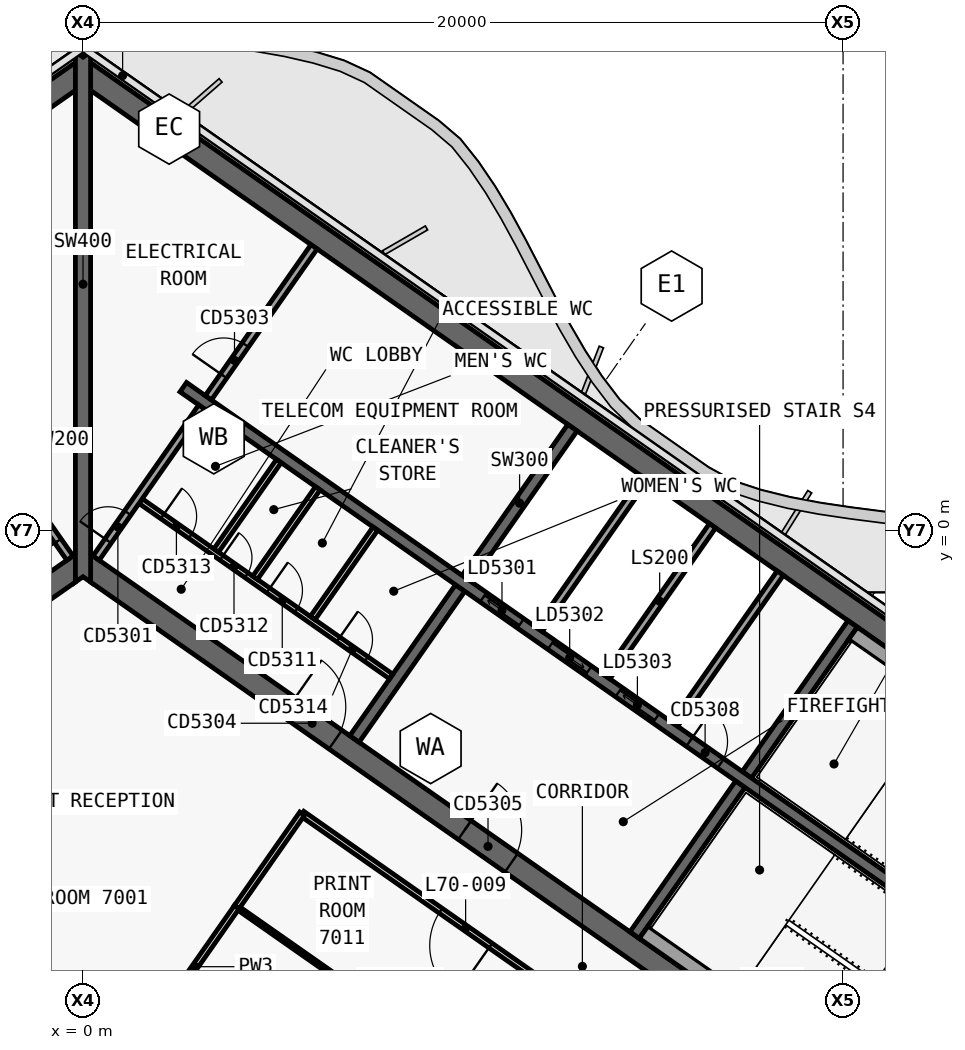
"""IFC4 building model, lengths in metres.
Left out: names, types, materials, properties, quantities, classifications, styles, units other than length and angle.
Written with IfcOpenShell. Run it as: python <this file> out.ifc"""

import sys

from ifc_helpers import new_model, si_unit, direction, frame, frame_2d, origin, place, context, subcontext, project, spatial, polyline, rectangle, outline, extrude, element, fill, save


model = new_model("IFC4")
c1 = context("Model", 3, precision=1e-05, world=origin(), true_north=direction((0.0, 1.0)))
c2 = subcontext(c1, "Body", "Model", "MODEL_VIEW")
j1 = project(units=[si_unit("LENGTHUNIT", "METRE"), si_unit("PLANEANGLEUNIT", "RADIAN")], contexts=[c1])
p1 = place(None, origin())
s1 = spatial("IfcSite", under=j1, at=p1, CompositionType="ELEMENT")
p2 = place(p1, origin())
s2 = spatial("IfcBuilding", under=s1, at=p2, CompositionType="ELEMENT")
p3 = place(p2, frame((0.0, 0.0, 295.6)))
s3 = spatial("IfcBuildingStorey", under=s2, at=p3, CompositionType="ELEMENT", Elevation=295.6)
p4 = place(p3, frame((-0.028, 12.066, 0.0), z_axis=(0.0, 0.0, 1.0), x_axis=(-0.819151382952, -0.573577380837, 0.0)))
e1 = element("IfcWall", 1, at=p4, inside=s3, PredefinedType="SHEAR", context=c2, shape_type="SweptSolid", body=[
    extrude(outline(polyline([(33.898, 0.3), (0.42, 0.3), (0.0, -0.3), (33.898, -0.3), (33.898, 0.3)])), origin(), (0.0, 0.0, 1.0), 3.9),
])
p5 = place(p3, frame((-0.028, -0.874, 0.0), z_axis=(0.0, 0.0, 1.0), x_axis=(-0.819150035022, -0.573579305871, 0.0)))
e2 = element("IfcWall", 2, at=p5, inside=s3, PredefinedType="SHEAR", context=c2, shape_type="SweptSolid", body=[
    extrude(outline(polyline([(26.476, 0.3), (0.42, 0.3), (0.0, -0.3), (26.476, -0.3), (26.476, 0.3)])), origin(), (0.0, 0.0, 1.0), 3.9),
])
p6 = place(p5, frame((2.976, 0.0, 0.0)))
e3 = element("IfcOpeningElement", 3, at=p6, cuts=e2, PredefinedType="OPENING", context=c2, shape_type="SweptSolid", body=[
    extrude(rectangle(XDim=2.4, YDim=2.1, at=frame_2d((1.2, 1.05))), frame((0.0, 0.31, 0.0), z_axis=(0.0, -1.0, 0.0), x_axis=(1.0, 0.0, 0.0)), (0.0, 0.0, 1.0), 0.62),
])
p7 = place(p5, frame((11.776, 0.0, 0.0)))
e4 = element("IfcOpeningElement", 4, at=p7, cuts=e2, PredefinedType="OPENING", context=c2, shape_type="SweptSolid", body=[
    extrude(rectangle(XDim=2.4, YDim=2.1, at=frame_2d((1.2, 1.05))), frame((0.0, 0.31, 0.0), z_axis=(0.0, -1.0, 0.0), x_axis=(1.0, 0.0, 0.0)), (0.0, 0.0, 1.0), 0.62),
])
p8 = place(p3, frame((0.028, 12.066, 0.0), z_axis=(0.0, 0.0, 1.0), x_axis=(0.819151382952, -0.573577380837, 0.0)))
e5 = element("IfcWall", 5, at=p8, inside=s3, PredefinedType="SHEAR", context=c2, shape_type="SweptSolid", body=[
    extrude(outline(polyline([(33.898, 0.3), (0.0, 0.3), (0.42, -0.3), (33.898, -0.3), (33.898, 0.3)])), origin(), (0.0, 0.0, 1.0), 3.9),
])
p9 = place(p3, frame((0.028, -0.874, 0.0), z_axis=(0.0, 0.0, 1.0), x_axis=(0.819150035022, -0.573579305871, 0.0)))
e6 = element("IfcWall", 6, at=p9, inside=s3, PredefinedType="SHEAR", context=c2, shape_type="SweptSolid", body=[
    extrude(outline(polyline([(26.476, 0.3), (0.0, 0.3), (0.42, -0.3), (26.476, -0.3), (26.476, 0.3)])), origin(), (0.0, 0.0, 1.0), 3.9),
])
p10 = place(p9, frame((6.576, 0.0, 0.0)))
e7 = element("IfcOpeningElement", 7, at=p10, cuts=e6, PredefinedType="OPENING", context=c2, shape_type="SweptSolid", body=[
    extrude(rectangle(XDim=1.5, YDim=2.1, at=frame_2d((0.75, 1.05))), frame((0.0, 0.31, 0.0), z_axis=(0.0, -1.0, 0.0), x_axis=(1.0, 0.0, 0.0)), (0.0, 0.0, 1.0), 0.62),
])
p11 = place(p9, frame((12.226, 0.0, 0.0)))
e8 = element("IfcOpeningElement", 8, at=p11, cuts=e6, PredefinedType="OPENING", context=c2, shape_type="SweptSolid", body=[
    extrude(rectangle(XDim=1.5, YDim=2.1, at=frame_2d((0.75, 1.05))), frame((0.0, 0.31, 0.0), z_axis=(0.0, -1.0, 0.0), x_axis=(1.0, 0.0, 0.0)), (0.0, 0.0, 1.0), 0.62),
])
p12 = place(p3, frame((7.143, -5.49, 0.0), z_axis=(0.0, 0.0, 1.0), x_axis=(0.573617744349, 0.819123118565, 0.0)))
e9 = element("IfcWall", 9, at=p12, inside=s3, PredefinedType="SHEAR", context=c2, shape_type="SweptSolid", body=[
    extrude(outline(polyline([(0.0, 0.15), (0.0, -0.15), (4.85, -0.15), (4.85, 0.15), (0.0, 0.15)])), origin(), (0.0, 0.0, 1.0), 3.9),
])
p13 = place(p3, frame((10.097, -1.271, 0.0), z_axis=(0.0, 0.0, 1.0), x_axis=(0.573560315113, 0.819163332265, 0.0)))
e10 = element("IfcWall", 10, at=p13, inside=s3, PredefinedType="SHEAR", context=c2, shape_type="SweptSolid", body=[
    extrude(outline(polyline([(4.85, -0.15), (4.85, 0.15), (0.0, 0.15), (0.0, -0.15), (4.85, -0.15)])), origin(), (0.0, 0.0, 1.0), 3.9),
])
p14 = place(p3, frame((14.515, -10.652, 0.0), z_axis=(0.0, 0.0, 1.0), x_axis=(0.573560315113, 0.819163332265, 0.0)))
e11 = element("IfcWall", 11, at=p14, inside=s3, PredefinedType="SHEAR", context=c2, shape_type="SweptSolid", body=[
    extrude(outline(polyline([(0.0, 0.15), (0.0, -0.15), (4.85, -0.15), (4.85, 0.15), (0.0, 0.15)])), origin(), (0.0, 0.0, 1.0), 3.9),
])
p15 = place(p3, frame((17.469, -6.433, 0.0), z_axis=(0.0, 0.0, 1.0), x_axis=(0.573594092424, 0.81913968109, 0.0)))
e12 = element("IfcWall", 12, at=p15, inside=s3, PredefinedType="SHEAR", context=c2, shape_type="SweptSolid", body=[
    extrude(outline(polyline([(4.85, -0.15), (4.85, 0.15), (0.0, 0.15), (0.0, -0.15), (4.85, -0.15)])), origin(), (0.0, 0.0, 1.0), 3.9),
])
p16 = place(p3, frame((2.638, 3.768, 0.0), z_axis=(0.0, 0.0, 1.0), x_axis=(0.819155014212, -0.573572194837, 0.0)))
e13 = element("IfcWall", 13, at=p16, inside=s3, PredefinedType="SHEAR", context=c2, shape_type="SweptSolid", body=[
    extrude(outline(polyline([(0.0, 0.15), (0.0, -0.15), (26.4, -0.15), (26.4, 0.15), (0.0, 0.15)])), origin(), (0.0, 0.0, 1.0), 3.9),
])
p17 = place(p16, frame((9.637, 0.0, 0.0)))
e14 = element("IfcOpeningElement", 14, at=p17, cuts=e13, PredefinedType="OPENING", context=c2, shape_type="SweptSolid", body=[
    extrude(rectangle(XDim=1.2, YDim=2.1, at=frame_2d((0.6, 1.05))), frame((0.0, 0.16, 0.0), z_axis=(0.0, -1.0, 0.0), x_axis=(1.0, 0.0, 0.0)), (0.0, 0.0, 1.0), 0.32),
])
p18 = place(p16, frame((11.812, 0.0, 0.0)))
e15 = element("IfcOpeningElement", 15, at=p18, cuts=e13, PredefinedType="OPENING", context=c2, shape_type="SweptSolid", body=[
    extrude(rectangle(XDim=1.2, YDim=2.1, at=frame_2d((0.6, 1.05))), frame((0.0, 0.16, 0.0), z_axis=(0.0, -1.0, 0.0), x_axis=(1.0, 0.0, 0.0)), (0.0, 0.0, 1.0), 0.32),
])
p19 = place(p16, frame((13.988, 0.0, 0.0)))
e16 = element("IfcOpeningElement", 16, at=p19, cuts=e13, PredefinedType="OPENING", context=c2, shape_type="SweptSolid", body=[
    extrude(rectangle(XDim=1.2, YDim=2.1, at=frame_2d((0.6, 1.05))), frame((0.0, 0.16, 0.0), z_axis=(0.0, -1.0, 0.0), x_axis=(1.0, 0.0, 0.0)), (0.0, 0.0, 1.0), 0.32),
])
p20 = place(p16, frame((16.262, 0.0, 0.0)))
e17 = element("IfcOpeningElement", 17, at=p20, cuts=e13, PredefinedType="OPENING", context=c2, shape_type="SweptSolid", body=[
    extrude(rectangle(XDim=1.0, YDim=2.1, at=frame_2d((0.5, 1.05))), frame((0.0, 0.16, 0.0), z_axis=(0.0, -1.0, 0.0), x_axis=(1.0, 0.0, 0.0)), (0.0, 0.0, 1.0), 0.32),
])
p21 = place(p3, frame((0.0, -1.361, 0.0), z_axis=(0.0, 0.0, 1.0), x_axis=(0.0, 1.0, 0.0)))
e18 = element("IfcWall", 18, at=p21, inside=s3, PredefinedType="SHEAR", context=c2, shape_type="SweptSolid", body=[
    extrude(outline(polyline([(0.14, 0.2), (0.0, 0.2), (0.14, 0.0), (0.0, -0.2), (0.14, -0.2), (1.012, -0.2), (12.94, -0.2), (13.813, -0.2), (13.893, -0.2), (13.933, -0.172), (13.813, 0.0), (13.933, 0.172), (13.893, 0.2), (13.813, 0.2), (12.94, 0.2), (1.012, 0.2), (0.14, 0.2)])), origin(), (0.0, 0.0, 1.0), 3.9),
])
p22 = place(p3, frame((12.001, -2.605, 0.0), z_axis=(0.0, 0.0, 1.0), x_axis=(0.573560315113, 0.819163332265, 0.0)))
e19 = element("IfcWall", 19, at=p22, inside=s3, PredefinedType="SOLIDWALL", context=c2, shape_type="SweptSolid", body=[
    extrude(rectangle(XDim=4.85, YDim=0.2, at=frame_2d((2.425, 0.0))), origin(), (0.0, 0.0, 1.0), 3.9),
])
p23 = place(p3, frame((13.783, -3.852, 0.0), z_axis=(0.0, 0.0, 1.0), x_axis=(0.573594092424, 0.81913968109, 0.0)))
e20 = element("IfcWall", 20, at=p23, inside=s3, PredefinedType="SOLIDWALL", context=c2, shape_type="SweptSolid", body=[
    extrude(rectangle(XDim=4.85, YDim=0.2, at=frame_2d((2.425, 0.0))), origin(), (0.0, 0.0, 1.0), 3.9),
])
p24 = place(p3, frame((15.565, -5.1, 0.0), z_axis=(0.0, 0.0, 1.0), x_axis=(0.573560315113, 0.819163332265, 0.0)))
e21 = element("IfcWall", 21, at=p24, inside=s3, PredefinedType="SOLIDWALL", context=c2, shape_type="SweptSolid", body=[
    extrude(rectangle(XDim=4.85, YDim=0.2, at=frame_2d((2.425, 0.0))), origin(), (0.0, 0.0, 1.0), 3.9),
])
p25 = place(p3, frame((1.516, 0.77, 0.0), z_axis=(0.0, 0.0, 1.0), x_axis=(0.819146424436, -0.573584462249, 0.0)))
e22 = element("IfcWall", 22, at=p25, inside=s3, PredefinedType="PARTITIONING", context=c2, shape_type="SweptSolid", body=[
    extrude(rectangle(XDim=8.05, YDim=0.15, at=frame_2d((4.025, 0.0))), origin(), (0.0, 0.0, 1.0), 3.62),
])
p26 = place(p25, frame((0.7, 0.0, 0.0)))
e23 = element("IfcOpeningElement", 23, at=p26, cuts=e22, PredefinedType="OPENING", context=c2, shape_type="SweptSolid", body=[
    extrude(rectangle(XDim=0.9, YDim=2.1, at=frame_2d((0.45, 1.05))), frame((0.0, 0.085, 0.0), z_axis=(0.0, -1.0, 0.0), x_axis=(1.0, 0.0, 0.0)), (0.0, 0.0, 1.0), 0.17),
])
p27 = place(p25, frame((2.6, 0.0, 0.0)))
e24 = element("IfcOpeningElement", 24, at=p27, cuts=e22, PredefinedType="OPENING", context=c2, shape_type="SweptSolid", body=[
    extrude(rectangle(XDim=0.8, YDim=2.1, at=frame_2d((0.4, 1.05))), frame((0.0, 0.085, 0.0), z_axis=(0.0, -1.0, 0.0), x_axis=(1.0, 0.0, 0.0)), (0.0, 0.0, 1.0), 0.17),
])
p28 = place(p25, frame((4.1, 0.0, 0.0)))
e25 = element("IfcOpeningElement", 25, at=p28, cuts=e22, PredefinedType="OPENING", context=c2, shape_type="SweptSolid", body=[
    extrude(rectangle(XDim=0.9, YDim=2.1, at=frame_2d((0.45, 1.05))), frame((0.0, 0.085, 0.0), z_axis=(0.0, -1.0, 0.0), x_axis=(1.0, 0.0, 0.0)), (0.0, 0.0, 1.0), 0.17),
])
p29 = place(p25, frame((6.35, 0.0, 0.0)))
e26 = element("IfcOpeningElement", 26, at=p29, cuts=e22, PredefinedType="OPENING", context=c2, shape_type="SweptSolid", body=[
    extrude(rectangle(XDim=0.9, YDim=2.1, at=frame_2d((0.45, 1.05))), frame((0.0, 0.085, 0.0), z_axis=(0.0, -1.0, 0.0), x_axis=(1.0, 0.0, 0.0)), (0.0, 0.0, 1.0), 0.17),
])
p30 = place(p3, frame((3.504, -0.531, 0.0), z_axis=(0.0, 0.0, 1.0), x_axis=(0.573582013179, 0.819148139324, 0.0)))
e27 = element("IfcWall", 27, at=p30, inside=s3, PredefinedType="PARTITIONING", context=c2, shape_type="SweptSolid", body=[
    extrude(rectangle(XDim=2.875, YDim=0.15, at=frame_2d((1.438, 0.0))), origin(), (0.0, 0.0, 1.0), 3.62),
])
p31 = place(p3, frame((4.528, -1.248, 0.0), z_axis=(0.0, 0.0, 1.0), x_axis=(0.573621911162, 0.819120200602, 0.0)))
e28 = element("IfcWall", 28, at=p31, inside=s3, PredefinedType="PARTITIONING", context=c2, shape_type="SweptSolid", body=[
    extrude(rectangle(XDim=2.875, YDim=0.15, at=frame_2d((1.438, 0.0))), origin(), (0.0, 0.0, 1.0), 3.62),
])
p32 = place(p3, frame((6.044, -2.309, 0.0), z_axis=(0.0, 0.0, 1.0), x_axis=(0.573564930514, 0.819160100642, 0.0)))
e29 = element("IfcWall", 29, at=p32, inside=s3, PredefinedType="PARTITIONING", context=c2, shape_type="SweptSolid", body=[
    extrude(rectangle(XDim=2.875, YDim=0.15, at=frame_2d((1.438, 0.0))), origin(), (0.0, 0.0, 1.0), 3.62),
])
p33 = place(p3, frame((20.259, -2.71, 0.0), z_axis=(0.0, 0.0, 1.0), x_axis=(0.81914849389, -0.573581506813, 0.0)))
e30 = element("IfcWall", 30, at=p33, inside=s3, PredefinedType="SOLIDWALL", context=c2, shape_type="SweptSolid", body=[
    extrude(rectangle(XDim=8.25, YDim=0.4, at=frame_2d((4.125, 0.0))), origin(), (0.0, 0.0, 1.0), 3.62),
])
p34 = place(p3, frame((14.753, -10.574, 0.0), z_axis=(0.0, 0.0, 1.0), x_axis=(0.819158229677, -0.573567602601, 0.0)))
e31 = element("IfcWall", 31, at=p34, inside=s3, PredefinedType="SOLIDWALL", context=c2, shape_type="SweptSolid", body=[
    extrude(rectangle(XDim=8.25, YDim=0.4, at=frame_2d((4.125, 0.0))), origin(), (0.0, 0.0, 1.0), 3.62),
])
p35 = place(p3, frame((-0.344, -0.729, 0.0), z_axis=(0.0, 0.0, 1.0), x_axis=(-0.573560315113, 0.819163332265, 0.0)))
e32 = element("IfcWall", 32, at=p35, inside=s3, PredefinedType="SOLIDWALL", context=c2, shape_type="SweptSolid", body=[
    extrude(rectangle(XDim=4.85, YDim=0.2, at=frame_2d((2.425, 0.0))), origin(), (0.0, 0.0, 1.0), 3.62),
])
p36 = place(p35, frame((0.55, 0.0, 0.0)))
e33 = element("IfcOpeningElement", 33, at=p36, cuts=e32, PredefinedType="OPENING", context=c2, shape_type="SweptSolid", body=[
    extrude(rectangle(XDim=0.9, YDim=2.1, at=frame_2d((0.45, 1.05))), frame((0.0, 0.11, 0.0), z_axis=(0.0, -1.0, 0.0), x_axis=(1.0, 0.0, 0.0)), (0.0, 0.0, 1.0), 0.22),
])
p37 = place(p3, frame((0.344, -0.729, 0.0), z_axis=(0.0, 0.0, 1.0), x_axis=(0.573560315113, 0.819163332265, 0.0)))
e34 = element("IfcWall", 34, at=p37, inside=s3, PredefinedType="SOLIDWALL", context=c2, shape_type="SweptSolid", body=[
    extrude(rectangle(XDim=4.85, YDim=0.2, at=frame_2d((2.425, 0.0))), origin(), (0.0, 0.0, 1.0), 3.62),
])
p38 = place(p37, frame((0.55, 0.0, 0.0)))
e35 = element("IfcOpeningElement", 35, at=p38, cuts=e34, PredefinedType="OPENING", context=c2, shape_type="SweptSolid", body=[
    extrude(rectangle(XDim=0.9, YDim=2.1, at=frame_2d((0.45, 1.05))), frame((0.0, 0.11, 0.0), z_axis=(0.0, -1.0, 0.0), x_axis=(1.0, 0.0, 0.0)), (0.0, 0.0, 1.0), 0.22),
])
p39 = place(p3, frame((3.298, 3.49, 0.0), z_axis=(0.0, 0.0, 1.0), x_axis=(0.573560315113, 0.819163332265, 0.0)))
e36 = element("IfcWall", 36, at=p39, inside=s3, PredefinedType="SOLIDWALL", context=c2, shape_type="SweptSolid", body=[
    extrude(rectangle(XDim=4.85, YDim=0.2, at=frame_2d((2.425, 0.0))), origin(), (0.0, 0.0, 1.0), 3.62),
])
p40 = place(p39, frame((0.7, 0.0, 0.0)))
e37 = element("IfcOpeningElement", 37, at=p40, cuts=e36, PredefinedType="OPENING", context=c2, shape_type="SweptSolid", body=[
    extrude(rectangle(XDim=1.0, YDim=2.1, at=frame_2d((0.5, 1.05))), frame((0.0, 0.11, 0.0), z_axis=(0.0, -1.0, 0.0), x_axis=(1.0, 0.0, 0.0)), (0.0, 0.0, 1.0), 0.22),
])
p41 = place(p3, frame((14.369, -13.479, 0.0), z_axis=(0.0, 0.0, 1.0), x_axis=(-0.819154371039, 0.573573113393, 0.0)))
e38 = element("IfcWall", 38, at=p41, inside=s3, PredefinedType="PARTITIONING", context=c2, shape_type="SweptSolid", body=[
    extrude(rectangle(XDim=10.502, YDim=0.15, at=frame_2d((5.251, 0.0))), origin(), (0.0, 0.0, 1.0), 3.05),
])
p42 = place(p41, frame((4.451, 0.0, 0.0)))
e39 = element("IfcOpeningElement", 39, at=p42, cuts=e38, PredefinedType="OPENING", context=c2, shape_type="SweptSolid", body=[
    extrude(rectangle(XDim=1.6, YDim=2.1, at=frame_2d((0.8, 1.05))), frame((0.0, 0.085, 0.0), z_axis=(0.0, -1.0, 0.0), x_axis=(1.0, 0.0, 0.0)), (0.0, 0.0, 1.0), 0.17),
])
p43 = place(p3, frame((12.646, -15.937, 0.0), z_axis=(0.0, 0.0, 1.0), x_axis=(-0.81914779845, 0.57358249999, 0.0)))
e40 = element("IfcWall", 40, at=p43, inside=s3, PredefinedType="PARTITIONING", context=c2, shape_type="SweptSolid", body=[
    extrude(rectangle(XDim=10.5, YDim=0.1, at=frame_2d((5.25, 0.0))), origin(), (0.0, 0.0, 1.0), 3.05),
])
p44 = place(p43, frame((4.8, 0.0, 0.0)))
e41 = element("IfcOpeningElement", 41, at=p44, cuts=e40, PredefinedType="OPENING", context=c2, shape_type="SweptSolid", body=[
    extrude(rectangle(XDim=0.9, YDim=2.1, at=frame_2d((0.45, 1.05))), frame((0.0, 0.06, 0.0), z_axis=(0.0, -1.0, 0.0), x_axis=(1.0, 0.0, 0.0)), (0.0, 0.0, 1.0), 0.12),
])
p45 = place(p3, frame((1.849, -13.051, 0.0), z_axis=(0.0, 0.0, 1.0), x_axis=(0.573594994199, 0.819139049631, 0.0)))
e42 = element("IfcWall", 42, at=p45, inside=s3, PredefinedType="PARTITIONING", context=c2, shape_type="SweptSolid", body=[
    extrude(rectangle(XDim=3.829, YDim=0.15, at=frame_2d((1.915, 0.0))), origin(), (0.0, 0.0, 1.0), 3.05),
])
p46 = place(p3, frame((4.046, -9.913, 0.0), z_axis=(0.0, 0.0, 1.0), x_axis=(0.573560650686, 0.819163097304, 0.0)))
e43 = element("IfcWall", 43, at=p46, inside=s3, PredefinedType="PARTITIONING", context=c2, shape_type="SweptSolid", body=[
    extrude(rectangle(XDim=3.0, YDim=0.15, at=frame_2d((1.5, 0.0))), origin(), (0.0, 0.0, 1.0), 3.05),
])
p47 = place(p17, origin())
e44 = element("IfcDoor", 44, at=p47, inside=s3, OperationType="SLIDING_TO_LEFT", PredefinedType="DOOR", context=c2, shape_type="SweptSolid", body=[
    extrude(rectangle(XDim=1.2, YDim=2.1, at=frame_2d((0.6, 1.05))), frame((0.0, 0.025, 0.0), z_axis=(0.0, -1.0, 0.0), x_axis=(1.0, 0.0, 0.0)), (0.0, 0.0, 1.0), 0.05),
])
fill(e14, e44)
p48 = place(p18, origin())
e45 = element("IfcDoor", 45, at=p48, inside=s3, OperationType="SLIDING_TO_RIGHT", PredefinedType="DOOR", context=c2, shape_type="SweptSolid", body=[
    extrude(rectangle(XDim=1.2, YDim=2.1, at=frame_2d((0.6, 1.05))), frame((0.0, 0.025, 0.0), z_axis=(0.0, -1.0, 0.0), x_axis=(1.0, 0.0, 0.0)), (0.0, 0.0, 1.0), 0.05),
])
fill(e15, e45)
p49 = place(p19, origin())
e46 = element("IfcDoor", 46, at=p49, inside=s3, OperationType="SLIDING_TO_LEFT", PredefinedType="DOOR", context=c2, shape_type="SweptSolid", body=[
    extrude(rectangle(XDim=1.2, YDim=2.1, at=frame_2d((0.6, 1.05))), frame((0.0, 0.025, 0.0), z_axis=(0.0, -1.0, 0.0), x_axis=(1.0, 0.0, 0.0)), (0.0, 0.0, 1.0), 0.05),
])
fill(e16, e46)
p50 = place(p20, origin())
e47 = element("IfcDoor", 47, at=p50, inside=s3, OperationType="SINGLE_SWING_RIGHT", PredefinedType="DOOR", context=c2, shape_type="SweptSolid", body=[
    extrude(rectangle(XDim=1.0, YDim=2.1, at=frame_2d((0.5, 1.05))), frame((0.0, 0.025, 0.0), z_axis=(0.0, -1.0, 0.0), x_axis=(1.0, 0.0, 0.0)), (0.0, 0.0, 1.0), 0.05),
])
fill(e17, e47)
p51 = place(p26, origin())
e48 = element("IfcDoor", 48, at=p51, inside=s3, OperationType="SINGLE_SWING_RIGHT", PredefinedType="DOOR", context=c2, shape_type="SweptSolid", body=[
    extrude(rectangle(XDim=0.9, YDim=2.1, at=frame_2d((0.45, 1.05))), frame((0.0, 0.025, 0.0), z_axis=(0.0, -1.0, 0.0), x_axis=(1.0, 0.0, 0.0)), (0.0, 0.0, 1.0), 0.05),
])
fill(e23, e48)
p52 = place(p27, origin())
e49 = element("IfcDoor", 49, at=p52, inside=s3, OperationType="SINGLE_SWING_RIGHT", PredefinedType="DOOR", context=c2, shape_type="SweptSolid", body=[
    extrude(rectangle(XDim=0.8, YDim=2.1, at=frame_2d((0.4, 1.05))), frame((0.0, 0.025, 0.0), z_axis=(0.0, -1.0, 0.0), x_axis=(1.0, 0.0, 0.0)), (0.0, 0.0, 1.0), 0.05),
])
fill(e24, e49)
p53 = place(p28, origin())
e50 = element("IfcDoor", 50, at=p53, inside=s3, OperationType="SINGLE_SWING_RIGHT", PredefinedType="DOOR", context=c2, shape_type="SweptSolid", body=[
    extrude(rectangle(XDim=0.9, YDim=2.1, at=frame_2d((0.45, 1.05))), frame((0.0, 0.025, 0.0), z_axis=(0.0, -1.0, 0.0), x_axis=(1.0, 0.0, 0.0)), (0.0, 0.0, 1.0), 0.05),
])
fill(e25, e50)
p54 = place(p29, origin())
e51 = element("IfcDoor", 51, at=p54, inside=s3, OperationType="SINGLE_SWING_RIGHT", PredefinedType="DOOR", context=c2, shape_type="SweptSolid", body=[
    extrude(rectangle(XDim=0.9, YDim=2.1, at=frame_2d((0.45, 1.05))), frame((0.0, 0.025, 0.0), z_axis=(0.0, -1.0, 0.0), x_axis=(1.0, 0.0, 0.0)), (0.0, 0.0, 1.0), 0.05),
])
fill(e26, e51)
p55 = place(p10, origin())
e52 = element("IfcDoor", 52, at=p55, inside=s3, OperationType="SINGLE_SWING_RIGHT", PredefinedType="DOOR", context=c2, shape_type="SweptSolid", body=[
    extrude(rectangle(XDim=1.5, YDim=2.1, at=frame_2d((0.75, 1.05))), frame((0.0, 0.025, 0.0), z_axis=(0.0, -1.0, 0.0), x_axis=(1.0, 0.0, 0.0)), (0.0, 0.0, 1.0), 0.05),
])
fill(e7, e52)
p56 = place(p11, origin())
e53 = element("IfcDoor", 53, at=p56, inside=s3, OperationType="DOUBLE_DOOR_SINGLE_SWING", PredefinedType="DOOR", context=c2, shape_type="SweptSolid", body=[
    extrude(rectangle(XDim=1.5, YDim=2.1, at=frame_2d((0.75, 1.05))), frame((0.0, 0.025, 0.0), z_axis=(0.0, -1.0, 0.0), x_axis=(1.0, 0.0, 0.0)), (0.0, 0.0, 1.0), 0.05),
])
fill(e8, e53)
p57 = place(p36, origin())
e54 = element("IfcDoor", 54, at=p57, inside=s3, OperationType="SINGLE_SWING_RIGHT", PredefinedType="DOOR", context=c2, shape_type="SweptSolid", body=[
    extrude(rectangle(XDim=0.9, YDim=2.1, at=frame_2d((0.45, 1.05))), frame((0.0, 0.025, 0.0), z_axis=(0.0, -1.0, 0.0), x_axis=(1.0, 0.0, 0.0)), (0.0, 0.0, 1.0), 0.05),
])
fill(e33, e54)
p58 = place(p38, origin())
e55 = element("IfcDoor", 55, at=p58, inside=s3, OperationType="SINGLE_SWING_RIGHT", PredefinedType="DOOR", context=c2, shape_type="SweptSolid", body=[
    extrude(rectangle(XDim=0.9, YDim=2.1, at=frame_2d((0.45, 1.05))), frame((0.0, 0.025, 0.0), z_axis=(0.0, -1.0, 0.0), x_axis=(1.0, 0.0, 0.0)), (0.0, 0.0, 1.0), 0.05),
])
fill(e35, e55)
p59 = place(p40, origin())
e56 = element("IfcDoor", 56, at=p59, inside=s3, OperationType="SINGLE_SWING_RIGHT", PredefinedType="DOOR", context=c2, shape_type="SweptSolid", body=[
    extrude(rectangle(XDim=1.0, YDim=2.1, at=frame_2d((0.5, 1.05))), frame((0.0, 0.025, 0.0), z_axis=(0.0, -1.0, 0.0), x_axis=(1.0, 0.0, 0.0)), (0.0, 0.0, 1.0), 0.05),
])
fill(e37, e56)
p60 = place(p42, origin())
e57 = element("IfcDoor", 57, at=p60, inside=s3, OperationType="DOUBLE_DOOR_SINGLE_SWING", PredefinedType="DOOR", context=c2, shape_type="SweptSolid", body=[
    extrude(rectangle(XDim=1.6, YDim=2.1, at=frame_2d((0.8, 1.05))), frame((0.0, 0.025, 0.0), z_axis=(0.0, -1.0, 0.0), x_axis=(1.0, 0.0, 0.0)), (0.0, 0.0, 1.0), 0.05),
])
fill(e39, e57)
save(model, sys.argv[1])
